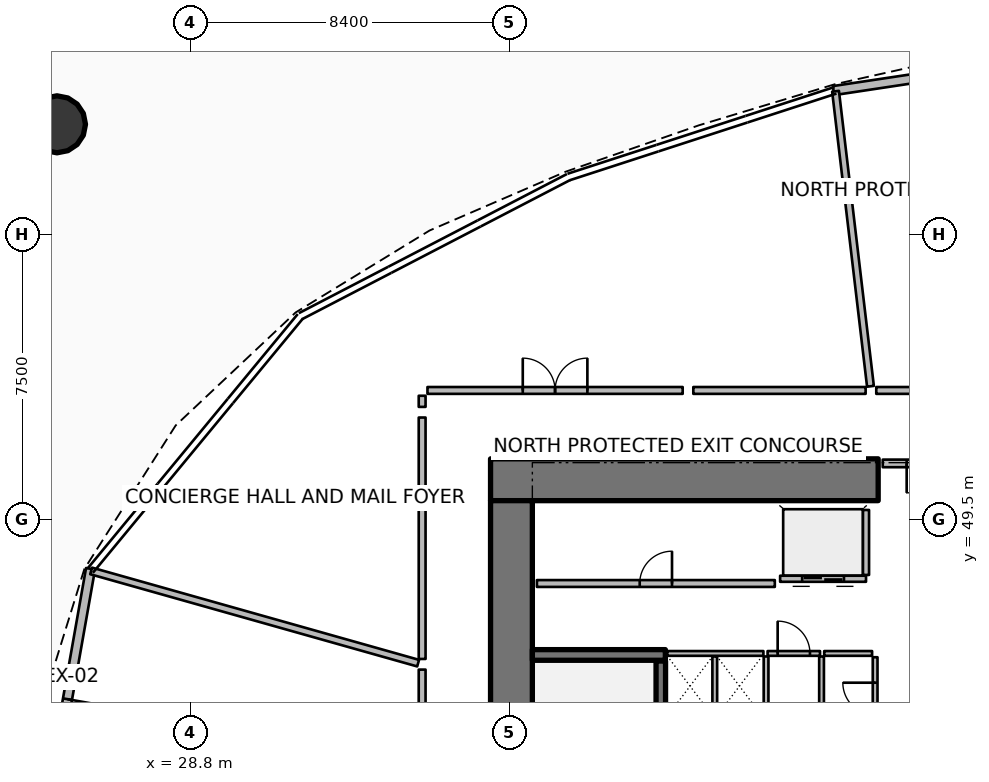
"""IFC4 building model, lengths in metres.
Left out: names, types, materials, properties, quantities, classifications, styles, units other than length and angle.
Written with IfcOpenShell. Run it as: python <this file> out.ifc"""

import sys

from ifc_helpers import new_model, si_unit, direction, frame, frame_2d, origin, origin_2d, place, context, subcontext, project, spatial, rectangle, circle, extrude, element, fill, save


model = new_model("IFC4")
c1 = context("Model", 3, precision=1e-05, world=origin(), true_north=direction((0.0, 1.0)))
c2 = subcontext(c1, "Body", "Model", "MODEL_VIEW")
j1 = project(units=[si_unit("LENGTHUNIT", "METRE"), si_unit("PLANEANGLEUNIT", "RADIAN")], contexts=[c1])
p1 = place(None, origin())
s1 = spatial("IfcSite", under=j1, at=p1, CompositionType="ELEMENT")
p2 = place(p1, origin())
s2 = spatial("IfcBuilding", under=s1, at=p2, CompositionType="ELEMENT")
p3 = place(p2, origin())
s3 = spatial("IfcBuildingStorey", under=s2, at=p3, CompositionType="ELEMENT", Elevation=0.0)
p4 = place(p3, frame((36.7, 50.55, 0.0), z_axis=(0.0, 0.0, 1.0), x_axis=(1.0, 0.0, 0.0)))
e1 = element("IfcWall", 1, at=p4, inside=s3, PredefinedType="SHEAR", context=c2, shape_type="SweptSolid", body=[
    extrude(rectangle(XDim=10.2, YDim=1.1, at=frame_2d((5.1, 0.0))), origin(), (0.0, 0.0, 1.0), 7.2),
])
p5 = place(p3, frame((37.25, 34.0, 0.0), z_axis=(0.0, 0.0, 1.0), x_axis=(0.0, 1.0, 0.0)))
e2 = element("IfcWall", 2, at=p5, inside=s3, PredefinedType="SHEAR", context=c2, shape_type="SweptSolid", body=[
    extrude(rectangle(XDim=16.0, YDim=1.1, at=frame_2d((8.0, 0.0))), origin(), (0.0, 0.0, 1.0), 7.2),
])
p6 = place(p3, frame((37.8, 45.94, 0.0), z_axis=(0.0, 0.0, 1.0), x_axis=(1.0, 0.0, 0.0)))
e3 = element("IfcWall", 3, at=p6, inside=s3, PredefinedType="SHEAR", context=c2, shape_type="SweptSolid", body=[
    extrude(rectangle(XDim=3.5, YDim=0.28, at=frame_2d((1.75, 0.0))), origin(), (0.0, 0.0, 1.0), 7.2),
])
p7 = place(p3, frame((25.291, 59.902, 0.0), z_axis=(0.0, 0.0, 1.0), x_axis=(1.0, 0.0, 0.0)))
e4 = element("IfcColumn", 4, at=p7, inside=s3, PredefinedType="COLUMN", context=c2, shape_type="SweptSolid", body=[
    extrude(circle(Radius=0.75, at=origin_2d()), origin(), (0.0, 0.0, 1.0), 6.8),
])
p8 = place(p3, frame((45.726, 60.79, 0.0), z_axis=(0.0, 0.0, 1.0), x_axis=(0.988842711484, 0.148963391291, 0.0)))
e5 = element("IfcWall", 5, at=p8, inside=s3, PredefinedType="SOLIDWALL", context=c2, shape_type="SweptSolid", body=[
    extrude(rectangle(XDim=8.049, YDim=0.24, at=frame_2d((4.024, 0.0))), origin(), (0.0, 0.0, 1.0), 5.35),
])
p9 = place(p8, frame((2.924, 0.0, 0.0)))
e6 = element("IfcOpeningElement", 6, at=p9, cuts=e5, PredefinedType="OPENING", context=c2, shape_type="SweptSolid", body=[
    extrude(rectangle(XDim=2.2, YDim=2.4, at=frame_2d((1.1, 1.2))), frame((0.0, 0.13, 0.0), z_axis=(0.0, -1.0, 0.0), x_axis=(1.0, 0.0, 0.0)), (0.0, 0.0, 1.0), 0.26),
])
p10 = place(p3, frame((24.578, 39.18, 0.0), z_axis=(0.0, 0.0, 1.0), x_axis=(0.174163599579, 0.984716731137, 0.0)))
e7 = element("IfcWall", 7, at=p10, inside=s3, PredefinedType="SOLIDWALL", context=c2, shape_type="SweptSolid", body=[
    extrude(rectangle(XDim=9.168, YDim=0.24, at=frame_2d((4.584, 0.0))), origin(), (0.0, 0.0, 1.0), 5.35),
])
p11 = place(p10, frame((3.484, 0.0, 0.0)))
e8 = element("IfcOpeningElement", 8, at=p11, cuts=e7, PredefinedType="OPENING", context=c2, shape_type="SweptSolid", body=[
    extrude(rectangle(XDim=2.2, YDim=2.4, at=frame_2d((1.1, 1.2))), frame((0.0, 0.13, 0.0), z_axis=(0.0, -1.0, 0.0), x_axis=(1.0, 0.0, 0.0)), (0.0, 0.0, 1.0), 0.26),
])
p12 = place(p3, frame((41.18, 38.22, 0.0), z_axis=(0.0, 0.0, 1.0), x_axis=(0.0, 1.0, 0.0)))
e9 = element("IfcWall", 9, at=p12, inside=s3, PredefinedType="SOLIDWALL", context=c2, shape_type="SweptSolid", body=[
    extrude(rectangle(XDim=7.56, YDim=0.25, at=frame_2d((3.78, 0.0))), origin(), (0.0, 0.0, 1.0), 6.8),
])
p13 = place(p12, frame((0.3, 0.0, 0.0)))
e10 = element("IfcOpeningElement", 10, at=p13, cuts=e9, PredefinedType="OPENING", context=c2, shape_type="SweptSolid", body=[
    extrude(rectangle(XDim=1.55, YDim=2.15, at=frame_2d((0.775, 1.075))), frame((0.0, 0.135, 0.0), z_axis=(0.0, -1.0, 0.0), x_axis=(1.0, 0.0, 0.0)), (0.0, 0.0, 1.0), 0.27),
])
p14 = place(p3, frame((46.58, 47.945, 0.0), z_axis=(0.0, 0.0, 1.0), x_axis=(-1.0, 0.0, 0.0)))
e11 = element("IfcWall", 11, at=p14, inside=s3, PredefinedType="PARTITIONING", context=c2, shape_type="SweptSolid", body=[
    extrude(rectangle(XDim=2.26, YDim=0.16, at=frame_2d((1.13, 0.0))), origin(), (0.0, 0.0, 1.0), 6.8),
])
p15 = place(p14, frame((0.58, 0.0, 0.0)))
e12 = element("IfcOpeningElement", 12, at=p15, cuts=e11, PredefinedType="OPENING", context=c2, shape_type="SweptSolid", body=[
    extrude(rectangle(XDim=1.1, YDim=2.1, at=frame_2d((0.55, 1.05))), frame((0.0, 0.09, 0.0), z_axis=(0.0, -1.0, 0.0), x_axis=(1.0, 0.0, 0.0)), (0.0, 0.0, 1.0), 0.18),
])
p16 = place(p3, frame((46.58, 48.045, 0.0), z_axis=(0.0, 0.0, 1.0), x_axis=(0.0, 1.0, 0.0)))
e13 = element("IfcWall", 13, at=p16, inside=s3, PredefinedType="PARTITIONING", context=c2, shape_type="SweptSolid", body=[
    extrude(rectangle(XDim=1.71, YDim=0.16, at=frame_2d((0.855, 0.0))), origin(), (0.0, 0.0, 1.0), 6.8),
])
p17 = place(p3, frame((37.92, 47.82, 0.0), z_axis=(0.0, 0.0, 1.0), x_axis=(1.0, 0.0, 0.0)))
e14 = element("IfcWall", 14, at=p17, inside=s3, PredefinedType="PARTITIONING", context=c2, shape_type="SweptSolid", body=[
    extrude(rectangle(XDim=6.26, YDim=0.18, at=frame_2d((3.13, 0.0))), origin(), (0.0, 0.0, 1.0), 6.8),
])
p18 = place(p17, frame((2.705, 0.0, 0.0)))
e15 = element("IfcOpeningElement", 15, at=p18, cuts=e14, PredefinedType="OPENING", context=c2, shape_type="SweptSolid", body=[
    extrude(rectangle(XDim=0.85, YDim=2.06, at=frame_2d((0.425, 1.03))), frame((0.0, 0.1, 0.0), z_axis=(0.0, -1.0, 0.0), x_axis=(1.0, 0.0, 0.0)), (0.0, 0.0, 1.0), 0.2),
])
p19 = place(p3, frame((47.02, 50.98, 0.0), z_axis=(0.0, 0.0, 1.0), x_axis=(1.0, 0.0, 0.0)))
e16 = element("IfcWall", 16, at=p19, inside=s3, PredefinedType="PARTITIONING", context=c2, shape_type="SweptSolid", body=[
    extrude(rectangle(XDim=2.81, YDim=0.2, at=frame_2d((1.405, 0.0))), origin(), (0.0, 0.0, 1.0), 6.8),
])
p20 = place(p19, frame((0.63, 0.0, 0.0)))
e17 = element("IfcOpeningElement", 17, at=p20, cuts=e16, PredefinedType="OPENING", context=c2, shape_type="SweptSolid", body=[
    extrude(rectangle(XDim=1.55, YDim=2.15, at=frame_2d((0.775, 1.075))), frame((0.0, 0.11, 0.0), z_axis=(0.0, -1.0, 0.0), x_axis=(1.0, 0.0, 0.0)), (0.0, 0.0, 1.0), 0.22),
])
p21 = place(p3, frame((42.6, 44.35, 0.0), z_axis=(0.0, 0.0, 1.0), x_axis=(0.0, 1.0, 0.0)))
e18 = element("IfcWall", 18, at=p21, inside=s3, PredefinedType="PARTITIONING", context=c2, shape_type="SweptSolid", body=[
    extrude(rectangle(XDim=1.55, YDim=0.125, at=frame_2d((0.775, 0.0))), origin(), (0.0, 0.0, 1.0), 6.24),
])
p22 = place(p3, frame((43.95, 41.58, 0.0), z_axis=(0.0, 0.0, 1.0), x_axis=(0.0, 1.0, 0.0)))
e19 = element("IfcWall", 19, at=p22, inside=s3, PredefinedType="PARTITIONING", context=c2, shape_type="SweptSolid", body=[
    extrude(rectangle(XDim=4.32, YDim=0.125, at=frame_2d((2.16, 0.0))), origin(), (0.0, 0.0, 1.0), 6.24),
])
p23 = place(p3, frame((45.41, 43.67, 0.0), z_axis=(0.0, 0.0, 1.0), x_axis=(0.0, 1.0, 0.0)))
e20 = element("IfcWall", 20, at=p23, inside=s3, PredefinedType="PARTITIONING", context=c2, shape_type="SweptSolid", body=[
    extrude(rectangle(XDim=2.23, YDim=0.125, at=frame_2d((1.115, 0.0))), origin(), (0.0, 0.0, 1.0), 6.24),
])
p24 = place(p3, frame((46.82, 43.69, 0.0), z_axis=(0.0, 0.0, 1.0), x_axis=(0.0, 1.0, 0.0)))
e21 = element("IfcWall", 21, at=p24, inside=s3, PredefinedType="PARTITIONING", context=c2, shape_type="SweptSolid", body=[
    extrude(rectangle(XDim=2.19, YDim=0.125, at=frame_2d((1.095, 0.0))), origin(), (0.0, 0.0, 1.0), 6.24),
])
p25 = place(p24, frame((0.67, 0.0, 0.0)))
e22 = element("IfcOpeningElement", 22, at=p25, cuts=e21, PredefinedType="OPENING", context=c2, shape_type="SweptSolid", body=[
    extrude(rectangle(XDim=0.85, YDim=2.06, at=frame_2d((0.425, 1.03))), frame((0.0, 0.073, 0.0), z_axis=(0.0, -1.0, 0.0), x_axis=(1.0, 0.0, 0.0)), (0.0, 0.0, 1.0), 0.145),
])
p26 = place(p3, frame((41.35, 45.98, 0.0), z_axis=(0.0, 0.0, 1.0), x_axis=(1.0, 0.0, 0.0)))
e23 = element("IfcWall", 23, at=p26, inside=s3, PredefinedType="PARTITIONING", context=c2, shape_type="SweptSolid", body=[
    extrude(rectangle(XDim=2.53, YDim=0.125, at=frame_2d((1.265, 0.0))), origin(), (0.0, 0.0, 1.0), 6.24),
])
p27 = place(p3, frame((43.99, 45.98, 0.0), z_axis=(0.0, 0.0, 1.0), x_axis=(1.0, 0.0, 0.0)))
e24 = element("IfcWall", 24, at=p27, inside=s3, PredefinedType="PARTITIONING", context=c2, shape_type="SweptSolid", body=[
    extrude(rectangle(XDim=1.38, YDim=0.125, at=frame_2d((0.69, 0.0))), origin(), (0.0, 0.0, 1.0), 6.24),
])
p28 = place(p27, frame((0.265, 0.0, 0.0)))
e25 = element("IfcOpeningElement", 25, at=p28, cuts=e24, PredefinedType="OPENING", context=c2, shape_type="SweptSolid", body=[
    extrude(rectangle(XDim=0.85, YDim=2.06, at=frame_2d((0.425, 1.03))), frame((0.0, 0.073, 0.0), z_axis=(0.0, -1.0, 0.0), x_axis=(1.0, 0.0, 0.0)), (0.0, 0.0, 1.0), 0.145),
])
p29 = place(p3, frame((45.48, 45.98, 0.0), z_axis=(0.0, 0.0, 1.0), x_axis=(1.0, 0.0, 0.0)))
e26 = element("IfcWall", 26, at=p29, inside=s3, PredefinedType="PARTITIONING", context=c2, shape_type="SweptSolid", body=[
    extrude(rectangle(XDim=1.26, YDim=0.125, at=frame_2d((0.63, 0.0))), origin(), (0.0, 0.0, 1.0), 6.24),
])
p30 = place(p3, frame((50.934, 52.9, 0.0), z_axis=(0.0, 0.0, 1.0), x_axis=(-1.0, 0.0, 0.0)))
e27 = element("IfcWall", 27, at=p30, inside=s3, PredefinedType="PARTITIONING", context=c2, shape_type="SweptSolid", body=[
    extrude(rectangle(XDim=4.084, YDim=0.18, at=frame_2d((2.042, 0.0))), origin(), (0.0, 0.0, 1.0), 5.375),
])
p31 = place(p30, frame((1.267, 0.0, 0.0)))
e28 = element("IfcOpeningElement", 28, at=p31, cuts=e27, PredefinedType="OPENING", context=c2, shape_type="SweptSolid", body=[
    extrude(rectangle(XDim=1.55, YDim=2.15, at=frame_2d((0.775, 1.075))), frame((0.0, 0.1, 0.0), z_axis=(0.0, -1.0, 0.0), x_axis=(1.0, 0.0, 0.0)), (0.0, 0.0, 1.0), 0.2),
])
p32 = place(p3, frame((46.697, 53.009, 0.0), z_axis=(0.0, 0.0, 1.0), x_axis=(-0.117524370387, 0.993069998724, 0.0)))
e29 = element("IfcWall", 29, at=p32, inside=s3, PredefinedType="PARTITIONING", context=c2, shape_type="SweptSolid", body=[
    extrude(rectangle(XDim=7.817, YDim=0.18, at=frame_2d((3.909, 0.0))), origin(), (0.0, 0.0, 1.0), 5.757),
])
p33 = place(p3, frame((46.57, 52.9, 0.0), z_axis=(0.0, 0.0, 1.0), x_axis=(-1.0, 0.0, 0.0)))
e30 = element("IfcWall", 30, at=p33, inside=s3, PredefinedType="PARTITIONING", context=c2, shape_type="SweptSolid", body=[
    extrude(rectangle(XDim=4.534, YDim=0.18, at=frame_2d((2.267, 0.0))), origin(), (0.0, 0.0, 1.0), 5.757),
])
p34 = place(p3, frame((41.756, 52.9, 0.0), z_axis=(0.0, 0.0, 1.0), x_axis=(-1.0, 0.0, 0.0)))
e31 = element("IfcWall", 31, at=p34, inside=s3, PredefinedType="PARTITIONING", context=c2, shape_type="SweptSolid", body=[
    extrude(rectangle(XDim=6.716, YDim=0.18, at=frame_2d((3.358, 0.0))), origin(), (0.0, 0.0, 1.0), 5.757),
])
p35 = place(p34, frame((2.508, 0.0, 0.0)))
e32 = element("IfcOpeningElement", 32, at=p35, cuts=e31, PredefinedType="OPENING", context=c2, shape_type="SweptSolid", body=[
    extrude(rectangle(XDim=1.7, YDim=2.15, at=frame_2d((0.85, 1.075))), frame((0.0, 0.1, 0.0), z_axis=(0.0, -1.0, 0.0), x_axis=(1.0, 0.0, 0.0)), (0.0, 0.0, 1.0), 0.2),
])
p36 = place(p3, frame((34.9, 52.76, 0.0), z_axis=(0.0, 0.0, 1.0), x_axis=(0.0, -1.0, 0.0)))
e33 = element("IfcWall", 33, at=p36, inside=s3, PredefinedType="PARTITIONING", context=c2, shape_type="SweptSolid", body=[
    extrude(rectangle(XDim=0.293, YDim=0.18, at=frame_2d((0.146, 0.0))), origin(), (0.0, 0.0, 1.0), 5.757),
])
p37 = place(p3, frame((34.9, 52.187, 0.0), z_axis=(0.0, 0.0, 1.0), x_axis=(0.0, -1.0, 0.0)))
e34 = element("IfcWall", 34, at=p37, inside=s3, PredefinedType="PARTITIONING", context=c2, shape_type="SweptSolid", body=[
    extrude(rectangle(XDim=6.353, YDim=0.18, at=frame_2d((3.176, 0.0))), origin(), (0.0, 0.0, 1.0), 5.375),
])
p38 = place(p3, frame((34.794, 45.725, 0.0), z_axis=(0.0, 0.0, 1.0), x_axis=(-0.962463212271, 0.271412168159, 0.0)))
e35 = element("IfcWall", 35, at=p38, inside=s3, PredefinedType="PARTITIONING", context=c2, shape_type="SweptSolid", body=[
    extrude(rectangle(XDim=8.94, YDim=0.18, at=frame_2d((4.47, 0.0))), origin(), (0.0, 0.0, 1.0), 5.375),
])
p39 = place(p3, frame((34.9, 45.555, 0.0), z_axis=(0.0, 0.0, 1.0), x_axis=(0.0, -1.0, 0.0)))
e36 = element("IfcWall", 36, at=p39, inside=s3, PredefinedType="PARTITIONING", context=c2, shape_type="SweptSolid", body=[
    extrude(rectangle(XDim=4.965, YDim=0.18, at=frame_2d((2.482, 0.0))), origin(), (0.0, 0.0, 1.0), 5.375),
])
p40 = place(p39, frame((1.708, 0.0, 0.0)))
e37 = element("IfcOpeningElement", 37, at=p40, cuts=e36, PredefinedType="OPENING", context=c2, shape_type="SweptSolid", body=[
    extrude(rectangle(XDim=1.55, YDim=2.15, at=frame_2d((0.775, 1.075))), frame((0.0, 0.1, 0.0), z_axis=(0.0, -1.0, 0.0), x_axis=(1.0, 0.0, 0.0)), (0.0, 0.0, 1.0), 0.2),
])
p41 = place(p11, origin())
e38 = element("IfcDoor", 38, at=p41, inside=s3, OperationType="DOUBLE_DOOR_SINGLE_SWING", PredefinedType="DOOR", context=c2, shape_type="SweptSolid", body=[
    extrude(rectangle(XDim=2.2, YDim=2.4, at=frame_2d((1.1, 1.2))), frame((0.0, 0.025, 0.0), z_axis=(0.0, -1.0, 0.0), x_axis=(1.0, 0.0, 0.0)), (0.0, 0.0, 1.0), 0.05),
])
fill(e8, e38)
p42 = place(p15, origin())
e39 = element("IfcDoor", 39, at=p42, inside=s3, OperationType="DOUBLE_DOOR_SLIDING", PredefinedType="DOOR", context=c2, shape_type="SweptSolid", body=[
    extrude(rectangle(XDim=1.1, YDim=2.1, at=frame_2d((0.55, 1.05))), frame((0.0, 0.025, 0.0), z_axis=(0.0, -1.0, 0.0), x_axis=(1.0, 0.0, 0.0)), (0.0, 0.0, 1.0), 0.05),
])
fill(e12, e39)
p43 = place(p18, origin())
e40 = element("IfcDoor", 40, at=p43, inside=s3, OperationType="SINGLE_SWING_RIGHT", PredefinedType="DOOR", context=c2, shape_type="SweptSolid", body=[
    extrude(rectangle(XDim=0.85, YDim=2.06, at=frame_2d((0.425, 1.03))), frame((0.0, 0.025, 0.0), z_axis=(0.0, -1.0, 0.0), x_axis=(1.0, 0.0, 0.0)), (0.0, 0.0, 1.0), 0.05),
])
fill(e15, e40)
p44 = place(p20, origin())
e41 = element("IfcDoor", 41, at=p44, inside=s3, OperationType="DOUBLE_DOOR_SINGLE_SWING", PredefinedType="DOOR", context=c2, shape_type="SweptSolid", body=[
    extrude(rectangle(XDim=1.55, YDim=2.15, at=frame_2d((0.775, 1.075))), frame((0.0, 0.025, 0.0), z_axis=(0.0, -1.0, 0.0), x_axis=(1.0, 0.0, 0.0)), (0.0, 0.0, 1.0), 0.05),
])
fill(e17, e41)
p45 = place(p25, origin())
e42 = element("IfcDoor", 42, at=p45, inside=s3, OperationType="SINGLE_SWING_RIGHT", PredefinedType="DOOR", context=c2, shape_type="SweptSolid", body=[
    extrude(rectangle(XDim=0.85, YDim=2.06, at=frame_2d((0.425, 1.03))), frame((0.0, 0.025, 0.0), z_axis=(0.0, -1.0, 0.0), x_axis=(1.0, 0.0, 0.0)), (0.0, 0.0, 1.0), 0.05),
])
fill(e22, e42)
p46 = place(p28, origin())
e43 = element("IfcDoor", 43, at=p46, inside=s3, OperationType="SINGLE_SWING_LEFT", PredefinedType="DOOR", context=c2, shape_type="SweptSolid", body=[
    extrude(rectangle(XDim=0.85, YDim=2.06, at=frame_2d((0.425, 1.03))), frame((0.0, 0.025, 0.0), z_axis=(0.0, -1.0, 0.0), x_axis=(1.0, 0.0, 0.0)), (0.0, 0.0, 1.0), 0.05),
])
fill(e25, e43)
p47 = place(p35, origin())
e44 = element("IfcDoor", 44, at=p47, inside=s3, OperationType="DOUBLE_DOOR_SINGLE_SWING", PredefinedType="DOOR", context=c2, shape_type="SweptSolid", body=[
    extrude(rectangle(XDim=1.7, YDim=2.15, at=frame_2d((0.85, 1.075))), frame((0.0, 0.025, 0.0), z_axis=(0.0, -1.0, 0.0), x_axis=(1.0, 0.0, 0.0)), (0.0, 0.0, 1.0), 0.05),
])
fill(e32, e44)
save(model, sys.argv[1])
